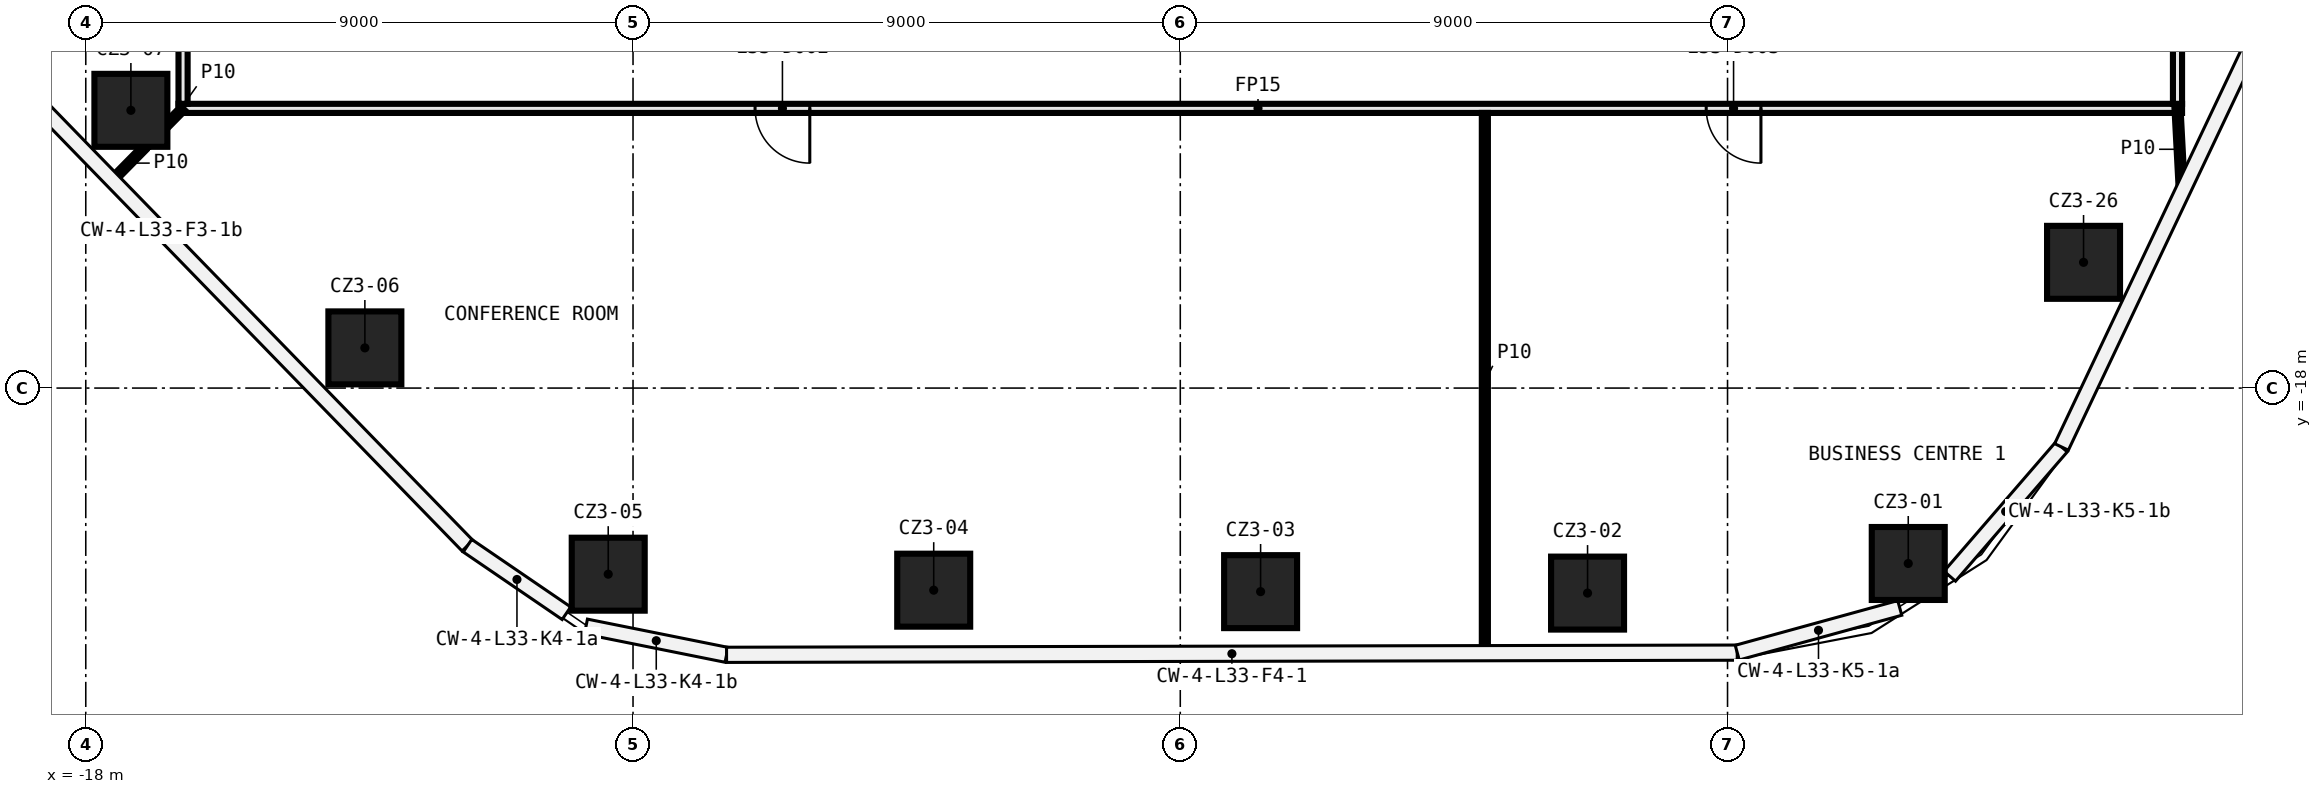
"""IFC4 building model, lengths in metres.
Left out: names, types, materials, properties, quantities, classifications, styles, units other than length and angle.
Written with IfcOpenShell. Run it as: python <this file> out.ifc"""

import sys

from ifc_helpers import new_model, si_unit, direction, frame, frame_2d, origin, origin_2d, place, context, subcontext, project, spatial, rectangle, extrude, element, fill, save


model = new_model("IFC4")
c1 = context("Model", 3, precision=1e-05, world=origin(), true_north=direction((0.0, 1.0)))
c2 = subcontext(c1, "Body", "Model", "MODEL_VIEW")
j1 = project(units=[si_unit("LENGTHUNIT", "METRE"), si_unit("PLANEANGLEUNIT", "RADIAN")], contexts=[c1])
p1 = place(None, origin())
s1 = spatial("IfcSite", under=j1, at=p1, CompositionType="ELEMENT")
p2 = place(p1, origin())
s2 = spatial("IfcBuilding", under=s1, at=p2, CompositionType="ELEMENT")
p3 = place(p2, frame((0.0, 0.0, 151.6)))
s3 = spatial("IfcBuildingStorey", under=s2, at=p3, CompositionType="ELEMENT", Elevation=151.6)
for number, where, z_axis, x_axis in (
    (1, (11.972, -20.885, 0.0), (0.0, 0.0, 1.0), (1.0, 0.0, 0.0)),
    (2, (6.698, -21.372, 0.0), (0.0, 0.0, 1.0), (1.0, 0.0, 0.0)),
    (3, (1.321, -21.348, 0.0), (0.0, 0.0, 1.0), (1.0, 0.0, 0.0)),
    (4, (-4.055, -21.324, 0.0), (0.0, 0.0, 1.0), (1.0, 0.0, 0.0)),
    (5, (-9.408, -21.061, 0.0), (0.0, 0.0, 1.0), (1.0, 0.0, 0.0)),
    (6, (-13.41, -17.339, 0.0), (0.0, 0.0, 1.0), (1.0, 0.0, 0.0)),
    (7, (-17.258, -13.432, 0.0), (0.0, 0.0, 1.0), (1.0, 0.0, 0.0)),
    (8, (14.855, -15.932, 0.0), (0.0, 0.0, 1.0), (1.0, 0.0, 0.0)),
):
    element("IfcColumn", number, at=place(p3, frame(where, z_axis=z_axis, x_axis=x_axis)), inside=s3, PredefinedType="COLUMN", context=c2, shape_type="SweptSolid", body=[
        extrude(rectangle(XDim=1.2, YDim=1.2, at=origin_2d()), origin(), (0.0, 0.0, 1.0), 6.62),
    ])
p4 = place(p3, frame((16.475, -13.4, 0.0), z_axis=(0.0, 0.0, 1.0), x_axis=(-1.0, 0.0, 0.0)))
e9 = element("IfcWall", 9, at=p4, inside=s3, PredefinedType="PARTITIONING", context=c2, shape_type="SweptSolid", body=[
    extrude(rectangle(XDim=32.95, YDim=0.15, at=frame_2d((16.475, 0.0))), origin(), (0.0, 0.0, 1.0), 6.62),
])
p5 = place(p4, frame((22.568, 0.0, 0.0)))
e10 = element("IfcOpeningElement", 10, at=p5, cuts=e9, PredefinedType="OPENING", context=c2, shape_type="SweptSolid", body=[
    extrude(rectangle(XDim=0.9, YDim=2.1, at=frame_2d((0.45, 1.05))), frame((0.0, 0.085, 0.0), z_axis=(0.0, -1.0, 0.0), x_axis=(1.0, 0.0, 0.0)), (0.0, 0.0, 1.0), 0.17),
])
p6 = place(p4, frame((6.926, 0.0, 0.0)))
e11 = element("IfcOpeningElement", 11, at=p6, cuts=e9, PredefinedType="OPENING", context=c2, shape_type="SweptSolid", body=[
    extrude(rectangle(XDim=0.9, YDim=2.1, at=frame_2d((0.45, 1.05))), frame((0.0, 0.085, 0.0), z_axis=(0.0, -1.0, 0.0), x_axis=(1.0, 0.0, 0.0)), (0.0, 0.0, 1.0), 0.17),
])
p7 = place(p3, frame((-17.55, -14.568, 0.0), z_axis=(0.0, 0.0, 1.0), x_axis=(0.701568764215, 0.712601760507, 0.0)))
e12 = element("IfcWall", 12, at=p7, inside=s3, PredefinedType="PARTITIONING", context=c2, shape_type="SweptSolid", body=[
    extrude(rectangle(XDim=0.752, YDim=0.1, at=frame_2d((0.376, 0.0))), origin(), (0.0, 0.0, 1.0), 6.62),
])
p8 = place(p3, frame((-16.658, -13.662, 0.0), z_axis=(0.0, 0.0, 1.0), x_axis=(0.701770352778, 0.712403236911, 0.0)))
e13 = element("IfcWall", 13, at=p8, inside=s3, PredefinedType="PARTITIONING", context=c2, shape_type="SweptSolid", body=[
    extrude(rectangle(XDim=0.367, YDim=0.1, at=frame_2d((0.184, 0.0))), origin(), (0.0, 0.0, 1.0), 6.62),
])
p9 = place(p3, frame((16.4, 13.325, 0.0), z_axis=(0.0, 0.0, 1.0), x_axis=(0.0, -1.0, 0.0)))
e14 = element("IfcWall", 14, at=p9, inside=s3, PredefinedType="PARTITIONING", context=c2, shape_type="SweptSolid", body=[
    extrude(rectangle(XDim=26.65, YDim=0.15, at=frame_2d((13.325, 0.0))), origin(), (0.0, 0.0, 1.0), 6.62),
])
p10 = place(p9, frame((11.877, 0.0, 0.0)))
e15 = element("IfcOpeningElement", 15, at=p10, cuts=e14, PredefinedType="OPENING", context=c2, shape_type="SweptSolid", body=[
    extrude(rectangle(XDim=0.9, YDim=2.1, at=frame_2d((0.45, 1.05))), frame((0.0, 0.085, 0.0), z_axis=(0.0, -1.0, 0.0), x_axis=(1.0, 0.0, 0.0)), (0.0, 0.0, 1.0), 0.17),
])
p11 = place(p9, frame((4.973, 0.0, 0.0)))
e16 = element("IfcOpeningElement", 16, at=p11, cuts=e14, PredefinedType="OPENING", context=c2, shape_type="SweptSolid", body=[
    extrude(rectangle(XDim=0.9, YDim=2.1, at=frame_2d((0.45, 1.05))), frame((0.0, 0.085, 0.0), z_axis=(0.0, -1.0, 0.0), x_axis=(1.0, 0.0, 0.0)), (0.0, 0.0, 1.0), 0.17),
])
p12 = place(p3, frame((5.009, -22.34, 0.0), z_axis=(0.0, 0.0, 1.0), x_axis=(0.0, 1.0, 0.0)))
e17 = element("IfcWall", 17, at=p12, inside=s3, PredefinedType="PARTITIONING", context=c2, shape_type="SweptSolid", body=[
    extrude(rectangle(XDim=8.865, YDim=0.1, at=frame_2d((4.433, 0.0))), origin(), (0.0, 0.0, 1.0), 6.62),
])
p13 = place(p3, frame((-16.4, -13.325, 0.0), z_axis=(0.0, 0.0, 1.0), x_axis=(0.0, 1.0, 0.0)))
e18 = element("IfcWall", 18, at=p13, inside=s3, PredefinedType="PARTITIONING", context=c2, shape_type="SweptSolid", body=[
    extrude(rectangle(XDim=26.65, YDim=0.15, at=frame_2d((13.325, 0.0))), origin(), (0.0, 0.0, 1.0), 6.62),
])
p14 = place(p13, frame((4.993, 0.0, 0.0)))
e19 = element("IfcOpeningElement", 19, at=p14, cuts=e18, PredefinedType="OPENING", context=c2, shape_type="SweptSolid", body=[
    extrude(rectangle(XDim=0.9, YDim=2.1, at=frame_2d((0.45, 1.05))), frame((0.0, 0.085, 0.0), z_axis=(0.0, -1.0, 0.0), x_axis=(1.0, 0.0, 0.0)), (0.0, 0.0, 1.0), 0.17),
])
p15 = place(p13, frame((10.403, 0.0, 0.0)))
e20 = element("IfcOpeningElement", 20, at=p15, cuts=e18, PredefinedType="OPENING", context=c2, shape_type="SweptSolid", body=[
    extrude(rectangle(XDim=0.9, YDim=2.1, at=frame_2d((0.45, 1.05))), frame((0.0, 0.085, 0.0), z_axis=(0.0, -1.0, 0.0), x_axis=(1.0, 0.0, 0.0)), (0.0, 0.0, 1.0), 0.17),
])
p16 = place(p3, frame((16.4, -13.4, 0.0), z_axis=(0.0, 0.0, 1.0), x_axis=(0.052197349417, -0.998636789185, 0.0)))
e21 = element("IfcWall", 21, at=p16, inside=s3, PredefinedType="PARTITIONING", context=c2, shape_type="SweptSolid", body=[
    extrude(rectangle(XDim=1.347, YDim=0.1, at=frame_2d((0.674, 0.0))), origin(), (0.0, 0.0, 1.0), 6.62),
])
p17 = place(p5, origin())
e22 = element("IfcDoor", 22, at=p17, inside=s3, OperationType="SINGLE_SWING_LEFT", PredefinedType="DOOR", context=c2, shape_type="SweptSolid", body=[
    extrude(rectangle(XDim=0.9, YDim=2.1, at=frame_2d((0.45, 1.05))), frame((0.0, 0.025, 0.0), z_axis=(0.0, -1.0, 0.0), x_axis=(1.0, 0.0, 0.0)), (0.0, 0.0, 1.0), 0.05),
])
fill(e10, e22)
p18 = place(p6, origin())
e23 = element("IfcDoor", 23, at=p18, inside=s3, OperationType="SINGLE_SWING_RIGHT", PredefinedType="DOOR", context=c2, shape_type="SweptSolid", body=[
    extrude(rectangle(XDim=0.9, YDim=2.1, at=frame_2d((0.45, 1.05))), frame((0.0, 0.025, 0.0), z_axis=(0.0, -1.0, 0.0), x_axis=(1.0, 0.0, 0.0)), (0.0, 0.0, 1.0), 0.05),
])
fill(e11, e23)
save(model, sys.argv[1])
